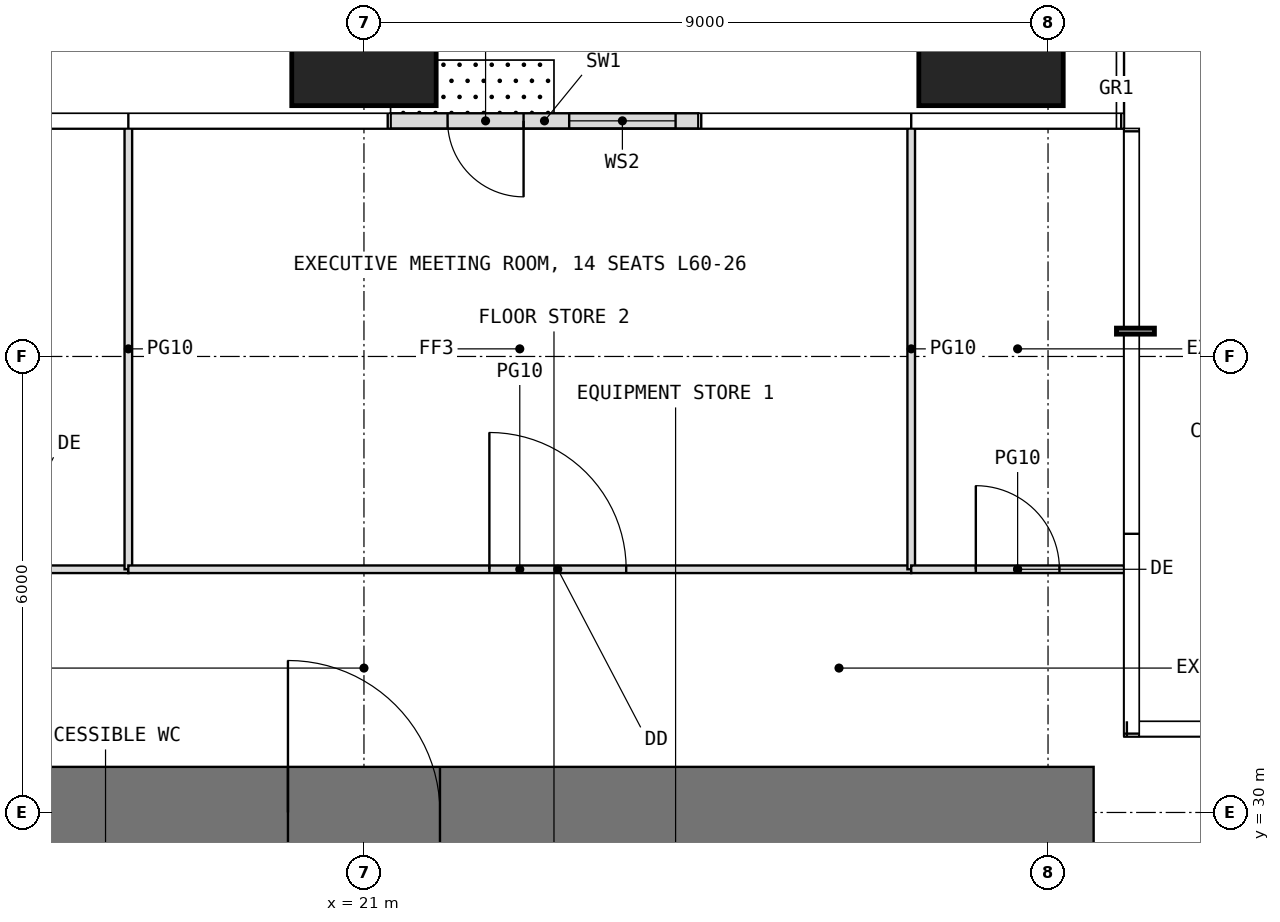
"""IFC4 building model, lengths in metres.
Left out: names, types, materials, properties, quantities, classifications, styles, units other than length and angle.
Written with IfcOpenShell. Run it as: python <this file> out.ifc"""

import sys

from ifc_helpers import new_model, si_unit, direction, frame, frame_2d, origin, origin_2d, place, context, subcontext, project, spatial, rectangle, extrude, element, fill, save


model = new_model("IFC4")
c1 = context("Model", 3, precision=1e-05, world=origin(), true_north=direction((0.0, 1.0)))
c2 = subcontext(c1, "Body", "Model", "MODEL_VIEW")
j1 = project(units=[si_unit("LENGTHUNIT", "METRE"), si_unit("PLANEANGLEUNIT", "RADIAN")], contexts=[c1])
p1 = place(None, origin())
s1 = spatial("IfcSite", under=j1, at=p1, CompositionType="ELEMENT")
p2 = place(p1, origin())
s2 = spatial("IfcBuilding", under=s1, at=p2, CompositionType="ELEMENT")
p3 = place(p2, frame((0.0, 0.0, 252.4)))
s3 = spatial("IfcBuildingStorey", under=s2, at=p3, CompositionType="ELEMENT", Elevation=252.4)
for number, where, z_axis, x_axis in (
    (1, (21.0, 40.25, 0.0), (0.0, 0.0, 1.0), (1.0, 0.0, 0.0)),
    (2, (29.25, 40.25, 0.0), (0.0, 0.0, 1.0), (1.0, 0.0, 0.0)),
):
    element("IfcColumn", number, at=place(p3, frame(where, z_axis=z_axis, x_axis=x_axis)), inside=s3, PredefinedType="COLUMN", context=c2, shape_type="SweptSolid", body=[
        extrude(rectangle(XDim=1.9, YDim=1.9, at=origin_2d()), origin(), (0.0, 0.0, 1.0), 4.2),
    ])
p4 = place(p3, frame((25.4, 39.1, 0.0), z_axis=(0.0, 0.0, 1.0), x_axis=(-1.0, 0.0, 0.0)))
e3 = element("IfcWall", 3, at=p4, inside=s3, PredefinedType="USERDEFINED", context=c2, shape_type="SweptSolid", body=[
    extrude(rectangle(XDim=4.05, YDim=0.2, at=frame_2d((2.025, 0.0))), origin(), (0.0, 0.0, 1.0), 3.95),
])
p5 = place(p4, frame((2.3, 0.0, 0.0)))
e4 = element("IfcOpeningElement", 4, at=p5, cuts=e3, PredefinedType="OPENING", context=c2, shape_type="SweptSolid", body=[
    extrude(rectangle(XDim=1.0, YDim=2.4, at=frame_2d((0.5, 1.2))), frame((0.0, 0.11, 0.0), z_axis=(0.0, -1.0, 0.0), x_axis=(1.0, 0.0, 0.0)), (0.0, 0.0, 1.0), 0.22),
])
p6 = place(p4, frame((0.3, 0.0, 0.3)))
e5 = element("IfcOpeningElement", 5, at=p6, cuts=e3, PredefinedType="OPENING", context=c2, shape_type="SweptSolid", body=[
    extrude(rectangle(XDim=1.4, YDim=2.7, at=frame_2d((0.7, 1.35))), frame((0.0, 0.11, 0.0), z_axis=(0.0, -1.0, 0.0), x_axis=(1.0, 0.0, 0.0)), (0.0, 0.0, 1.0), 0.22),
])
p7 = place(p3, frame((11.4, 30.0, -0.05), z_axis=(0.0, 0.0, 1.0), x_axis=(1.0, 0.0, 0.0)))
e6 = element("IfcWall", 6, at=p7, inside=s3, PredefinedType="SHEAR", context=c2, shape_type="SweptSolid", body=[
    extrude(rectangle(XDim=19.2, YDim=1.2, at=frame_2d((9.6, 0.0))), origin(), (0.0, 0.0, 1.0), 4.2),
])
p8 = place(p7, frame((8.6, 0.0, 0.05)))
e7 = element("IfcOpeningElement", 7, at=p8, cuts=e6, PredefinedType="OPENING", context=c2, shape_type="SweptSolid", body=[
    extrude(rectangle(XDim=2.0, YDim=2.2, at=frame_2d((1.0, 1.1))), frame((0.0, 0.61, 0.0), z_axis=(0.0, -1.0, 0.0), x_axis=(1.0, 0.0, 0.0)), (0.0, 0.0, 1.0), 1.22),
])
p9 = place(p3, frame((14.45, 33.2, 0.0), z_axis=(0.0, 0.0, 1.0), x_axis=(1.0, 0.0, 0.0)))
e8 = element("IfcWall", 8, at=p9, inside=s3, PredefinedType="PARTITIONING", context=c2, shape_type="SweptSolid", body=[
    extrude(rectangle(XDim=3.45, YDim=0.1, at=frame_2d((1.725, 0.0))), origin(), (0.0, 0.0, 1.0), 3.95),
])
p10 = place(p9, frame((1.175, 0.0, 0.0)))
e9 = element("IfcOpeningElement", 9, at=p10, cuts=e8, PredefinedType="OPENING", context=c2, shape_type="SweptSolid", body=[
    extrude(rectangle(XDim=1.1, YDim=2.3, at=frame_2d((0.55, 1.15))), frame((0.0, 0.06, 0.0), z_axis=(0.0, -1.0, 0.0), x_axis=(1.0, 0.0, 0.0)), (0.0, 0.0, 1.0), 0.12),
])
p11 = place(p3, frame((17.9, 33.2, 0.0), z_axis=(0.0, 0.0, 1.0), x_axis=(0.0, 1.0, 0.0)))
e10 = element("IfcWall", 10, at=p11, inside=s3, PredefinedType="PARTITIONING", context=c2, shape_type="SweptSolid", body=[
    extrude(rectangle(XDim=5.8, YDim=0.1, at=frame_2d((2.9, 0.0))), origin(), (0.0, 0.0, 1.0), 3.95),
])
p12 = place(p3, frame((17.9, 33.2, 0.0), z_axis=(0.0, 0.0, 1.0), x_axis=(1.0, 0.0, 0.0)))
e11 = element("IfcWall", 11, at=p12, inside=s3, PredefinedType="PARTITIONING", context=c2, shape_type="SweptSolid", body=[
    extrude(rectangle(XDim=10.3, YDim=0.1, at=frame_2d((5.15, 0.0))), origin(), (0.0, 0.0, 1.0), 3.95),
])
p13 = place(p12, frame((4.75, 0.0, 0.0)))
e12 = element("IfcOpeningElement", 12, at=p13, cuts=e11, PredefinedType="OPENING", context=c2, shape_type="SweptSolid", body=[
    extrude(rectangle(XDim=1.8, YDim=2.4, at=frame_2d((0.9, 1.2))), frame((0.0, 0.06, 0.0), z_axis=(0.0, -1.0, 0.0), x_axis=(1.0, 0.0, 0.0)), (0.0, 0.0, 1.0), 0.12),
])
p14 = place(p3, frame((28.2, 33.2, 0.0), z_axis=(0.0, 0.0, 1.0), x_axis=(0.0, 1.0, 0.0)))
e13 = element("IfcWall", 13, at=p14, inside=s3, PredefinedType="PARTITIONING", context=c2, shape_type="SweptSolid", body=[
    extrude(rectangle(XDim=5.8, YDim=0.1, at=frame_2d((2.9, 0.0))), origin(), (0.0, 0.0, 1.0), 3.95),
])
p15 = place(p3, frame((28.2, 33.2, 0.0), z_axis=(0.0, 0.0, 1.0), x_axis=(1.0, 0.0, 0.0)))
e14 = element("IfcWall", 14, at=p15, inside=s3, PredefinedType="PARTITIONING", context=c2, shape_type="SweptSolid", body=[
    extrude(rectangle(XDim=2.8, YDim=0.1, at=frame_2d((1.4, 0.0))), origin(), (0.0, 0.0, 1.0), 3.95),
])
p16 = place(p15, frame((0.85, 0.0, 0.0)))
e15 = element("IfcOpeningElement", 15, at=p16, cuts=e14, PredefinedType="OPENING", context=c2, shape_type="SweptSolid", body=[
    extrude(rectangle(XDim=1.1, YDim=2.3, at=frame_2d((0.55, 1.15))), frame((0.0, 0.06, 0.0), z_axis=(0.0, -1.0, 0.0), x_axis=(1.0, 0.0, 0.0)), (0.0, 0.0, 1.0), 0.12),
])
p17 = place(p5, origin())
e16 = element("IfcDoor", 16, at=p17, inside=s3, OperationType="SINGLE_SWING_LEFT", PredefinedType="DOOR", context=c2, shape_type="SweptSolid", body=[
    extrude(rectangle(XDim=1.0, YDim=2.4, at=frame_2d((0.5, 1.2))), frame((0.0, 0.025, 0.0), z_axis=(0.0, -1.0, 0.0), x_axis=(1.0, 0.0, 0.0)), (0.0, 0.0, 1.0), 0.05),
])
fill(e4, e16)
p18 = place(p6, origin())
e17 = element("IfcWindow", 17, at=p18, inside=s3, PartitioningType="SINGLE_PANEL", PredefinedType="WINDOW", context=c2, shape_type="SweptSolid", body=[
    extrude(rectangle(XDim=1.4, YDim=2.7, at=frame_2d((0.7, 1.35))), frame((0.0, 0.03, 0.0), z_axis=(0.0, -1.0, 0.0), x_axis=(1.0, 0.0, 0.0)), (0.0, 0.0, 1.0), 0.06),
])
fill(e5, e17)
p19 = place(p8, origin())
e18 = element("IfcDoor", 18, at=p19, inside=s3, OperationType="DOUBLE_DOOR_SINGLE_SWING", PredefinedType="DOOR", context=c2, shape_type="SweptSolid", body=[
    extrude(rectangle(XDim=2.0, YDim=2.2, at=frame_2d((1.0, 1.1))), frame((0.0, 0.025, 0.0), z_axis=(0.0, -1.0, 0.0), x_axis=(1.0, 0.0, 0.0)), (0.0, 0.0, 1.0), 0.05),
])
fill(e7, e18)
p20 = place(p13, origin())
e19 = element("IfcDoor", 19, at=p20, inside=s3, OperationType="DOUBLE_DOOR_SINGLE_SWING", PredefinedType="DOOR", context=c2, shape_type="SweptSolid", body=[
    extrude(rectangle(XDim=1.8, YDim=2.4, at=frame_2d((0.9, 1.2))), frame((0.0, 0.025, 0.0), z_axis=(0.0, -1.0, 0.0), x_axis=(1.0, 0.0, 0.0)), (0.0, 0.0, 1.0), 0.05),
])
fill(e12, e19)
p21 = place(p16, origin())
e20 = element("IfcDoor", 20, at=p21, inside=s3, OperationType="SINGLE_SWING_LEFT", PredefinedType="DOOR", context=c2, shape_type="SweptSolid", body=[
    extrude(rectangle(XDim=1.1, YDim=2.3, at=frame_2d((0.55, 1.15))), frame((0.0, 0.025, 0.0), z_axis=(0.0, -1.0, 0.0), x_axis=(1.0, 0.0, 0.0)), (0.0, 0.0, 1.0), 0.05),
])
fill(e15, e20)
save(model, sys.argv[1])
